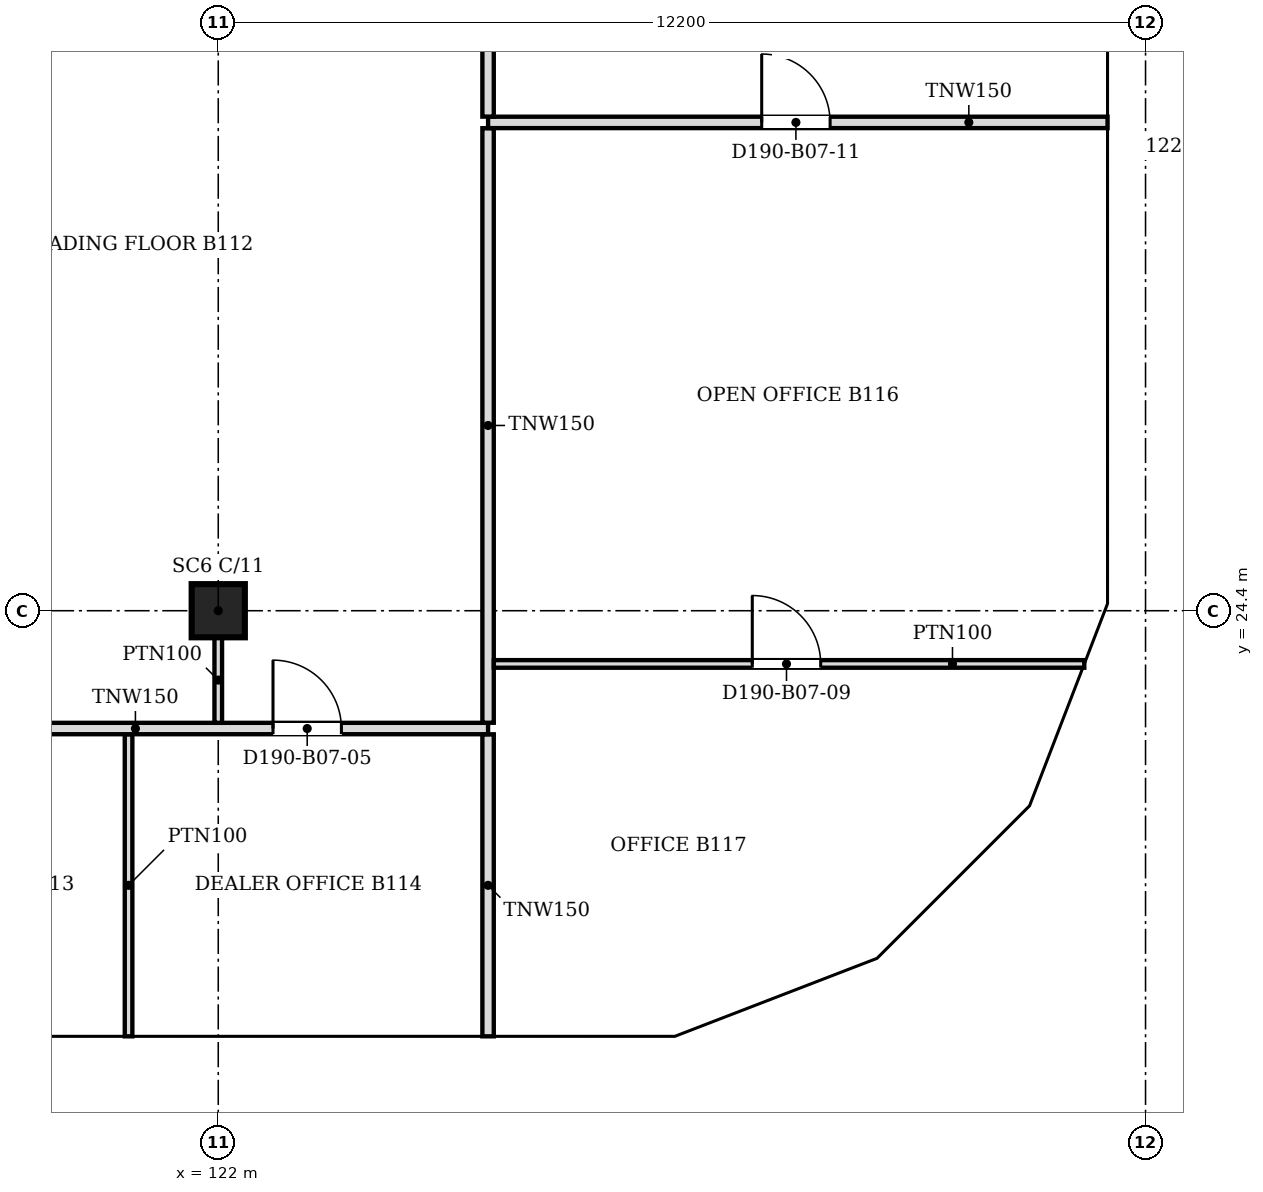
"""IFC4 building model, lengths in metres.
Left out: names, types, materials, properties, quantities, classifications, styles, units other than length and angle.
Written with IfcOpenShell. Run it as: python <this file> out.ifc"""

import sys

from ifc_helpers import new_model, si_unit, direction, frame, frame_2d, origin, origin_2d, place, context, subcontext, project, spatial, polyline, rectangle, outline, extrude, faceted_brep, source, transform, mapped, element, fill, save


model = new_model("IFC4")
c1 = context("Model", 3, precision=1e-05, world=origin(), true_north=direction((0.0, 1.0)))
c2 = subcontext(c1, "Body", "Model", "MODEL_VIEW")
j1 = project(units=[si_unit("LENGTHUNIT", "METRE"), si_unit("PLANEANGLEUNIT", "RADIAN")], contexts=[c1])
p1 = place(None, origin())
s1 = spatial("IfcSite", under=j1, at=p1, CompositionType="ELEMENT")
p2 = place(p1, origin())
s2 = spatial("IfcBuilding", under=s1, at=p2, CompositionType="ELEMENT")
p3 = place(p2, frame((0.0, 0.0, 68.6)))
s3 = spatial("IfcBuildingStorey", under=s2, at=p3, CompositionType="ELEMENT", Elevation=68.6)
p4 = place(p3, frame((122.0, 24.4, 0.0), z_axis=(0.0, 0.0, 1.0), x_axis=(1.0, 0.0, 0.0)))
e1 = element("IfcColumn", 1, at=p4, inside=s3, PredefinedType="COLUMN", context=c2, shape_type="SweptSolid", body=[
    extrude(rectangle(XDim=0.7, YDim=0.7, at=origin_2d()), origin(), (0.0, 0.0, 1.0), 3.6),
])
m1 = source(origin(), c2, "Body", "SweptSolid", [
    extrude(outline(polyline([(6.1, 0.0), (3.05, 3.8), (0.0, 0.0), (6.1, 0.0)])), frame((0.0, 0.25, 0.0), z_axis=(0.0, -1.0, 0.0), x_axis=(1.0, 0.0, 0.0)), (0.0, 0.0, 1.0), 0.5),
])
p5 = place(p3, frame((118.95, 18.55, 0.0), z_axis=(0.0, 0.0, 1.0), x_axis=(1.0, 0.0, 0.0)))
e2 = element("IfcWall", 2, at=p5, inside=s3, PredefinedType="SOLIDWALL", context=c2, shape_type="MappedRepresentation", body=[
    mapped(m1, transform((0.0, 0.0, 0.0), scale=1.0)),
])
m2 = source(origin(), c2, "Body", "SweptSolid", [
    extrude(outline(polyline([(5.579, 0.25), (3.05, 3.4), (0.521, 0.25), (5.579, 0.25)])), frame((0.0, 0.26, 0.0), z_axis=(0.0, -1.0, 0.0), x_axis=(1.0, 0.0, 0.0)), (0.0, 0.0, 1.0), 0.52),
])
p6 = place(p5, origin())
e3 = element("IfcOpeningElement", 3, at=p6, cuts=e2, PredefinedType="OPENING", context=c2, shape_type="MappedRepresentation", body=[
    mapped(m2, transform((0.0, 0.0, 0.0), scale=1.0)),
])
m3 = source(origin(), c2, "Body", "Brep", [
    faceted_brep([(3.05, -0.25, 3.74), (3.003, -0.25, 3.8), (0.0, -0.25, 0.0), (3.05, -0.25, 0.0), (0.0, 0.25, 0.0), (2.957, 0.25, 3.741), (2.957, 0.25, 0.0), (3.003, 0.0, 3.8)], [[[0, 1, 2, 3]], [[4, 5, 6]], [[7, 1, 0]], [[5, 4, 2, 1, 7]], [[4, 6, 3, 2]], [[3, 6, 5, 7, 0]]]),
])
p7 = place(p3, frame((125.05, 18.55, 0.0), z_axis=(0.0, 0.0, 1.0), x_axis=(1.0, 0.0, 0.0)))
e4 = element("IfcWall", 4, at=p7, inside=s3, PredefinedType="SOLIDWALL", context=c2, shape_type="MappedRepresentation", body=[
    mapped(m3, transform((0.0, 0.0, 0.0), scale=1.0)),
])
m4 = source(origin(), c2, "Body", "SweptSolid", [
    extrude(outline(polyline([(2.803, 3.144), (0.516, 0.25), (2.803, 0.25), (2.803, 3.144)])), frame((0.0, 0.26, 0.0), z_axis=(0.0, -1.0, 0.0), x_axis=(1.0, 0.0, 0.0)), (0.0, 0.0, 1.0), 0.52),
])
p8 = place(p7, origin())
e5 = element("IfcOpeningElement", 5, at=p8, cuts=e4, PredefinedType="OPENING", context=c2, shape_type="MappedRepresentation", body=[
    mapped(m4, transform((0.0, 0.0, 0.0), scale=1.0)),
])
m5 = source(origin(), c2, "Body", "Brep", [
    faceted_brep([(2.997, -0.25, 0.0), (0.047, -0.25, 3.8), (0.0, -0.25, 3.741), (0.0, -0.25, 0.0), (0.093, 0.25, 3.74), (2.944, 0.25, 0.068), (2.944, 0.25, 0.0), (0.093, 0.25, 0.0), (0.047, 0.0, 3.8), (2.997, 0.0, 0.0)], [[[0, 1, 2, 3]], [[4, 5, 6, 7]], [[5, 4, 8, 1, 0, 9]], [[2, 1, 8]], [[7, 6, 9, 0, 3]], [[7, 3, 2, 8, 4]], [[9, 6, 5]]]),
])
p9 = place(p3, frame((128.01, 18.533, 0.0), z_axis=(0.0, 0.0, 1.0), x_axis=(0.932990326376, 0.359901446078, 0.0)))
e6 = element("IfcWall", 6, at=p9, inside=s3, PredefinedType="SOLIDWALL", context=c2, shape_type="MappedRepresentation", body=[
    mapped(m5, transform((0.0, 0.0, 0.0), scale=1.0)),
])
m6 = source(origin(), c2, "Body", "SweptSolid", [
    extrude(outline(polyline([(2.487, 0.25), (0.247, 3.135), (0.247, 0.25), (2.487, 0.25)])), frame((0.0, 0.26, 0.0), z_axis=(0.0, -1.0, 0.0), x_axis=(1.0, 0.0, 0.0)), (0.0, 0.0, 1.0), 0.52),
])
p10 = place(p9, origin())
e7 = element("IfcOpeningElement", 7, at=p10, cuts=e6, PredefinedType="OPENING", context=c2, shape_type="MappedRepresentation", body=[
    mapped(m6, transform((0.0, 0.0, 0.0), scale=1.0)),
])
m7 = source(origin(), c2, "Body", "Brep", [
    faceted_brep([(2.997, -0.25, 3.732), (2.944, -0.25, 3.8), (0.0, -0.25, 0.0), (2.997, -0.25, 0.0), (0.053, 0.25, 0.068), (2.891, 0.25, 3.732), (2.891, 0.25, 0.0), (0.053, 0.25, 0.0), (2.944, 0.0, 3.8), (0.0, 0.0, 0.0)], [[[0, 1, 2, 3]], [[4, 5, 6, 7]], [[8, 1, 0]], [[5, 4, 9, 2, 1, 8]], [[7, 6, 3, 2, 9]], [[7, 9, 4]], [[3, 6, 5, 8, 0]]]),
])
p11 = place(p3, frame((130.806, 19.612, 0.0), z_axis=(0.0, 0.0, 1.0), x_axis=(0.707106781187, 0.707106781187, 0.0)))
e8 = element("IfcWall", 8, at=p11, inside=s3, PredefinedType="SOLIDWALL", context=c2, shape_type="MappedRepresentation", body=[
    mapped(m7, transform((0.0, 0.0, 0.0), scale=1.0)),
])
m8 = source(origin(), c2, "Body", "SweptSolid", [
    extrude(outline(polyline([(2.744, 3.134), (0.51, 0.25), (2.744, 0.25), (2.744, 3.134)])), frame((0.0, 0.26, 0.0), z_axis=(0.0, -1.0, 0.0), x_axis=(1.0, 0.0, 0.0)), (0.0, 0.0, 1.0), 0.52),
])
p12 = place(p11, origin())
e9 = element("IfcOpeningElement", 9, at=p12, cuts=e8, PredefinedType="OPENING", context=c2, shape_type="MappedRepresentation", body=[
    mapped(m8, transform((0.0, 0.0, 0.0), scale=1.0)),
])
m9 = source(origin(), c2, "Body", "Brep", [
    faceted_brep([(3.003, -0.25, 0.0), (0.053, -0.25, 3.8), (0.0, -0.25, 3.731), (0.0, -0.25, 0.0), (0.106, 0.25, 3.732), (2.957, 0.25, 0.06), (2.957, 0.25, 0.0), (0.106, 0.25, 0.0), (0.053, 0.0, 3.8), (3.003, 0.0, 0.0)], [[[0, 1, 2, 3]], [[4, 5, 6, 7]], [[5, 4, 8, 1, 0, 9]], [[2, 1, 8]], [[7, 6, 9, 0, 3]], [[7, 3, 2, 8, 4]], [[9, 6, 5]]]),
])
p13 = place(p3, frame((132.869, 21.644, 0.0), z_axis=(0.0, 0.0, 1.0), x_axis=(0.359855894603, 0.933007896601, 0.0)))
e10 = element("IfcWall", 10, at=p13, inside=s3, PredefinedType="SOLIDWALL", context=c2, shape_type="MappedRepresentation", body=[
    mapped(m9, transform((0.0, 0.0, 0.0), scale=1.0)),
])
m10 = source(origin(), c2, "Body", "SweptSolid", [
    extrude(outline(polyline([(2.493, 0.25), (0.253, 3.135), (0.253, 0.25), (2.493, 0.25)])), frame((0.0, 0.26, 0.0), z_axis=(0.0, -1.0, 0.0), x_axis=(1.0, 0.0, 0.0)), (0.0, 0.0, 1.0), 0.52),
])
p14 = place(p13, origin())
e11 = element("IfcOpeningElement", 11, at=p14, cuts=e10, PredefinedType="OPENING", context=c2, shape_type="MappedRepresentation", body=[
    mapped(m10, transform((0.0, 0.0, 0.0), scale=1.0)),
])
m11 = source(origin(), c2, "Body", "Brep", [
    faceted_brep([(6.053, -0.25, 0.0), (3.003, -0.25, 3.8), (0.0, -0.25, 0.0), (0.047, 0.25, 0.059), (3.003, 0.25, 3.8), (6.053, 0.25, 0.0), (0.047, 0.25, 0.0), (0.0, 0.0, 0.0)], [[[0, 1, 2]], [[3, 4, 5, 6]], [[5, 4, 1, 0]], [[4, 3, 7, 2, 1]], [[6, 5, 0, 2, 7]], [[6, 7, 3]]]),
])
p15 = place(p3, frame((133.95, 24.447, 0.0), z_axis=(0.0, 0.0, 1.0), x_axis=(0.0, 1.0, 0.0)))
e12 = element("IfcWall", 12, at=p15, inside=s3, PredefinedType="SOLIDWALL", context=c2, shape_type="MappedRepresentation", body=[
    mapped(m11, transform((0.0, 0.0, 0.0), scale=1.0)),
])
m12 = source(origin(), c2, "Body", "SweptSolid", [
    extrude(outline(polyline([(5.532, 0.25), (3.005, 3.399), (0.516, 0.25), (5.532, 0.25)])), frame((0.0, 0.26, 0.0), z_axis=(0.0, -1.0, 0.0), x_axis=(1.0, 0.0, 0.0)), (0.0, 0.0, 1.0), 0.52),
])
p16 = place(p15, origin())
e13 = element("IfcOpeningElement", 13, at=p16, cuts=e12, PredefinedType="OPENING", context=c2, shape_type="MappedRepresentation", body=[
    mapped(m12, transform((0.0, 0.0, 0.0), scale=1.0)),
])
p17 = place(p3, frame((133.95, 30.5, 0.0), z_axis=(0.0, 0.0, 1.0), x_axis=(0.0, 1.0, 0.0)))
e14 = element("IfcWall", 14, at=p17, inside=s3, PredefinedType="SOLIDWALL", context=c2, shape_type="MappedRepresentation", body=[
    mapped(m1, transform((0.0, 0.0, 0.0), scale=1.0)),
])
p18 = place(p17, origin())
e15 = element("IfcOpeningElement", 15, at=p18, cuts=e14, PredefinedType="OPENING", context=c2, shape_type="MappedRepresentation", body=[
    mapped(m2, transform((0.0, 0.0, 0.0), scale=1.0)),
])
p19 = place(p2, frame((0.0, 0.0, 72.4)))
s4 = spatial("IfcBuildingStorey", under=s2, at=p19, CompositionType="ELEMENT", Elevation=72.4)
m13 = source(origin(), c2, "Body", "SweptSolid", [
    extrude(outline(polyline([(3.05, 0.0), (6.1, 3.8), (3.05, 7.6), (0.0, 3.8), (3.05, 0.0)])), frame((0.0, 0.25, 0.0), z_axis=(0.0, -1.0, 0.0), x_axis=(1.0, 0.0, 0.0)), (0.0, 0.0, 1.0), 0.5),
])
p20 = place(p19, frame((115.9, 18.55, -3.8), z_axis=(0.0, 0.0, 1.0), x_axis=(1.0, 0.0, 0.0)))
e16 = element("IfcWall", 16, at=p20, inside=s4, PredefinedType="SOLIDWALL", context=c2, shape_type="MappedRepresentation", body=[
    mapped(m13, transform((0.0, 0.0, 0.0), scale=1.0)),
])
m14 = source(origin(), c2, "Body", "SweptSolid", [
    extrude(outline(polyline([(3.05, 0.399), (5.78, 3.8), (3.05, 7.2), (0.321, 3.8), (3.05, 0.399)])), frame((0.0, 0.26, 0.0), z_axis=(0.0, -1.0, 0.0), x_axis=(1.0, 0.0, 0.0)), (0.0, 0.0, 1.0), 0.52),
])
p21 = place(p20, origin())
e17 = element("IfcOpeningElement", 17, at=p21, cuts=e16, PredefinedType="OPENING", context=c2, shape_type="MappedRepresentation", body=[
    mapped(m14, transform((0.0, 0.0, 0.0), scale=1.0)),
])
m15 = source(origin(), c2, "Body", "Brep", [
    faceted_brep([(3.05, -0.25, 0.0), (6.053, -0.25, 3.8), (3.05, -0.25, 7.6), (0.0, -0.25, 3.8), (0.0, 0.25, 3.8), (3.05, 0.25, 7.6), (6.007, 0.25, 3.859), (6.007, 0.25, 3.741), (3.05, 0.25, 0.0), (6.053, 0.0, 3.8)], [[[0, 1, 2, 3]], [[4, 5, 6, 7, 8]], [[8, 7, 9, 1, 0]], [[6, 5, 2, 1, 9]], [[5, 4, 3, 2]], [[4, 8, 0, 3]], [[9, 7, 6]]]),
])
p22 = place(p19, frame((122.0, 18.55, -3.8), z_axis=(0.0, 0.0, 1.0), x_axis=(1.0, 0.0, 0.0)))
e18 = element("IfcWall", 18, at=p22, inside=s4, PredefinedType="SOLIDWALL", context=c2, shape_type="MappedRepresentation", body=[
    mapped(m15, transform((0.0, 0.0, 0.0), scale=1.0)),
])
m16 = source(origin(), c2, "Body", "SweptSolid", [
    extrude(outline(polyline([(3.049, 0.401), (5.735, 3.8), (3.049, 7.199), (0.321, 3.8), (3.049, 0.401)])), frame((0.0, 0.26, 0.0), z_axis=(0.0, -1.0, 0.0), x_axis=(1.0, 0.0, 0.0)), (0.0, 0.0, 1.0), 0.52),
])
p23 = place(p22, origin())
e19 = element("IfcOpeningElement", 19, at=p23, cuts=e18, PredefinedType="OPENING", context=c2, shape_type="MappedRepresentation", body=[
    mapped(m16, transform((0.0, 0.0, 0.0), scale=1.0)),
])
m17 = source(origin(), c2, "Body", "Brep", [
    faceted_brep([(2.95, -0.25, 0.0), (3.003, -0.25, 0.068), (3.003, -0.25, 7.531), (2.95, -0.25, 7.6), (0.0, -0.25, 3.8), (0.047, 0.25, 3.86), (2.898, 0.25, 7.532), (2.898, 0.25, 0.068), (0.047, 0.25, 3.74), (2.95, 0.0, 0.0), (2.95, 0.0, 7.6), (0.0, 0.0, 3.8)], [[[0, 1, 2, 3, 4]], [[5, 6, 7, 8]], [[1, 0, 9]], [[10, 3, 2]], [[6, 5, 11, 4, 3, 10]], [[8, 7, 9, 0, 4, 11]], [[8, 11, 5]], [[1, 9, 7, 6, 10, 2]]]),
])
p24 = place(p19, frame((128.053, 18.55, -3.8), z_axis=(0.0, 0.0, 1.0), x_axis=(0.933007896601, 0.359855894603, 0.0)))
e20 = element("IfcWall", 20, at=p24, inside=s4, PredefinedType="SOLIDWALL", context=c2, shape_type="MappedRepresentation", body=[
    mapped(m17, transform((0.0, 0.0, 0.0), scale=1.0)),
])
m18 = source(origin(), c2, "Body", "SweptSolid", [
    extrude(outline(polyline([(2.75, 6.935), (0.316, 3.8), (2.75, 0.665), (2.75, 6.935)])), frame((0.0, 0.26, 0.0), z_axis=(0.0, -1.0, 0.0), x_axis=(1.0, 0.0, 0.0)), (0.0, 0.0, 1.0), 0.52),
])
p25 = place(p24, origin())
e21 = element("IfcOpeningElement", 21, at=p25, cuts=e20, PredefinedType="OPENING", context=c2, shape_type="MappedRepresentation", body=[
    mapped(m18, transform((0.0, 0.0, 0.0), scale=1.0)),
])
m19 = source(origin(), c2, "Body", "Brep", [
    faceted_brep([(0.053, -0.25, 0.0), (2.997, -0.25, 3.8), (0.053, -0.25, 7.6), (0.0, -0.25, 7.532), (0.0, -0.25, 0.068), (0.106, 0.25, 7.531), (2.944, 0.25, 3.868), (2.944, 0.25, 3.732), (0.106, 0.25, 0.068), (2.997, 0.0, 3.8), (0.053, 0.0, 0.0), (0.053, 0.0, 7.6)], [[[0, 1, 2, 3, 4]], [[5, 6, 7, 8]], [[8, 7, 9, 1, 0, 10]], [[6, 5, 11, 2, 1, 9]], [[3, 2, 11]], [[10, 0, 4]], [[8, 10, 4, 3, 11, 5]], [[9, 7, 6]]]),
])
p26 = place(p19, frame((130.769, 19.574, -3.8), z_axis=(0.0, 0.0, 1.0), x_axis=(0.707106781187, 0.707106781187, 0.0)))
e22 = element("IfcWall", 22, at=p26, inside=s4, PredefinedType="SOLIDWALL", context=c2, shape_type="MappedRepresentation", body=[
    mapped(m19, transform((0.0, 0.0, 0.0), scale=1.0)),
])
m20 = source(origin(), c2, "Body", "SweptSolid", [
    extrude(outline(polyline([(0.253, 0.666), (2.681, 3.8), (0.253, 6.934), (0.253, 0.666)])), frame((0.0, 0.26, 0.0), z_axis=(0.0, -1.0, 0.0), x_axis=(1.0, 0.0, 0.0)), (0.0, 0.0, 1.0), 0.52),
])
p27 = place(p26, origin())
e23 = element("IfcOpeningElement", 23, at=p27, cuts=e22, PredefinedType="OPENING", context=c2, shape_type="MappedRepresentation", body=[
    mapped(m20, transform((0.0, 0.0, 0.0), scale=1.0)),
])
m21 = source(origin(), c2, "Body", "Brep", [
    faceted_brep([(2.95, -0.25, 0.0), (2.997, -0.25, 0.059), (2.997, -0.25, 7.541), (2.95, -0.25, 7.6), (0.0, -0.25, 3.8), (0.053, 0.25, 3.868), (2.904, 0.25, 7.54), (2.904, 0.25, 0.06), (0.053, 0.25, 3.732), (2.95, 0.0, 0.0), (2.95, 0.0, 7.6), (0.0, 0.0, 3.8)], [[[0, 1, 2, 3, 4]], [[5, 6, 7, 8]], [[1, 0, 9]], [[10, 3, 2]], [[6, 5, 11, 4, 3, 10]], [[8, 7, 9, 0, 4, 11]], [[8, 11, 5]], [[1, 9, 7, 6, 10, 2]]]),
])
p28 = place(p19, frame((132.888, 21.694, -3.8), z_axis=(0.0, 0.0, 1.0), x_axis=(0.359901446078, 0.932990326376, 0.0)))
e24 = element("IfcWall", 24, at=p28, inside=s4, PredefinedType="SOLIDWALL", context=c2, shape_type="MappedRepresentation", body=[
    mapped(m21, transform((0.0, 0.0, 0.0), scale=1.0)),
])
p29 = place(p28, origin())
e25 = element("IfcOpeningElement", 25, at=p29, cuts=e24, PredefinedType="OPENING", context=c2, shape_type="MappedRepresentation", body=[
    mapped(m18, transform((0.0, 0.0, 0.0), scale=1.0)),
])
m22 = source(origin(), c2, "Body", "Brep", [
    faceted_brep([(0.047, -0.25, 0.0), (3.05, -0.25, 3.8), (0.047, -0.25, 7.6), (0.0, -0.25, 7.54), (0.0, -0.25, 0.06), (0.093, 0.25, 7.541), (3.05, 0.25, 3.8), (0.093, 0.25, 0.059), (0.047, 0.0, 0.0), (0.047, 0.0, 7.6)], [[[0, 1, 2, 3, 4]], [[5, 6, 7]], [[7, 6, 1, 0, 8]], [[6, 5, 9, 2, 1]], [[3, 2, 9]], [[8, 0, 4]], [[7, 8, 4, 3, 9, 5]]]),
])
p30 = place(p19, frame((133.95, 24.4, -3.8), z_axis=(0.0, 0.0, 1.0), x_axis=(0.0, 1.0, 0.0)))
e26 = element("IfcWall", 26, at=p30, inside=s4, PredefinedType="SOLIDWALL", context=c2, shape_type="MappedRepresentation", body=[
    mapped(m22, transform((0.0, 0.0, 0.0), scale=1.0)),
])
m23 = source(origin(), c2, "Body", "SweptSolid", [
    extrude(outline(polyline([(0.247, 0.656), (2.731, 3.8), (0.247, 6.944), (0.247, 0.656)])), frame((0.0, 0.26, 0.0), z_axis=(0.0, -1.0, 0.0), x_axis=(1.0, 0.0, 0.0)), (0.0, 0.0, 1.0), 0.52),
])
p31 = place(p30, origin())
e27 = element("IfcOpeningElement", 27, at=p31, cuts=e26, PredefinedType="OPENING", context=c2, shape_type="MappedRepresentation", body=[
    mapped(m23, transform((0.0, 0.0, 0.0), scale=1.0)),
])
p32 = place(p19, frame((133.95, 27.45, -3.8), z_axis=(0.0, 0.0, 1.0), x_axis=(0.0, 1.0, 0.0)))
e28 = element("IfcWall", 28, at=p32, inside=s4, PredefinedType="SOLIDWALL", context=c2, shape_type="MappedRepresentation", body=[
    mapped(m13, transform((0.0, 0.0, 0.0), scale=1.0)),
])
p33 = place(p32, origin())
e29 = element("IfcOpeningElement", 29, at=p33, cuts=e28, PredefinedType="OPENING", context=c2, shape_type="MappedRepresentation", body=[
    mapped(m14, transform((0.0, 0.0, 0.0), scale=1.0)),
])
p34 = place(p3, frame((120.82, 18.8, 0.0), z_axis=(0.0, 0.0, 1.0), x_axis=(0.0, 1.0, 0.0)))
e30 = element("IfcWall", 30, at=p34, inside=s3, PredefinedType="PARTITIONING", context=c2, shape_type="SweptSolid", body=[
    extrude(rectangle(XDim=3.974, YDim=0.1, at=frame_2d((1.987, 0.0))), origin(), (0.0, 0.0, 1.0), 3.067),
])
p35 = place(p3, frame((125.55, 18.8, 0.0), z_axis=(0.0, 0.0, 1.0), x_axis=(0.0, 1.0, 0.0)))
e31 = element("IfcWall", 31, at=p35, inside=s3, PredefinedType="PARTITIONING", context=c2, shape_type="SweptSolid", body=[
    extrude(rectangle(XDim=3.974, YDim=0.15, at=frame_2d((1.987, 0.0))), origin(), (0.0, 0.0, 1.0), 3.067),
])
p36 = place(p3, frame((125.55, 22.85, 0.0), z_axis=(0.0, 0.0, 1.0), x_axis=(-1.0, 0.0, 0.0)))
e32 = element("IfcWall", 32, at=p36, inside=s3, PredefinedType="PARTITIONING", context=c2, shape_type="SweptSolid", body=[
    extrude(rectangle(XDim=9.15, YDim=0.15, at=frame_2d((4.575, 0.0))), origin(), (0.0, 0.0, 1.0), 3.067),
])
m24 = source(origin(), c2, "Body", "SweptSolid", [
    extrude(rectangle(XDim=0.9, YDim=2.1, at=frame_2d((0.45, 1.05))), frame((0.0, 0.085, 0.0), z_axis=(0.0, -1.0, 0.0), x_axis=(1.0, 0.0, 0.0)), (0.0, 0.0, 1.0), 0.17),
])
p37 = place(p36, frame((6.45, 0.0, 0.0)))
e33 = element("IfcOpeningElement", 33, at=p37, cuts=e32, PredefinedType="OPENING", context=c2, shape_type="MappedRepresentation", body=[
    mapped(m24, transform((0.0, 0.0, 0.0), scale=1.0)),
])
p38 = place(p36, frame((1.93, 0.0, 0.0)))
e34 = element("IfcOpeningElement", 34, at=p38, cuts=e32, PredefinedType="OPENING", context=c2, shape_type="MappedRepresentation", body=[
    mapped(m24, transform((0.0, 0.0, 0.0), scale=1.0)),
])
p39 = place(p3, frame((125.55, 22.926, 0.0), z_axis=(0.0, 0.0, 1.0), x_axis=(0.0, 1.0, 0.0)))
e35 = element("IfcWall", 35, at=p39, inside=s3, PredefinedType="PARTITIONING", context=c2, shape_type="SweptSolid", body=[
    extrude(rectangle(XDim=7.823, YDim=0.15, at=frame_2d((3.912, 0.0))), origin(), (0.0, 0.0, 1.0), 3.067),
])
p40 = place(p3, frame((133.394, 23.7, 0.0), z_axis=(0.0, 0.0, 1.0), x_axis=(-1.0, 0.0, 0.0)))
e36 = element("IfcWall", 36, at=p40, inside=s3, PredefinedType="PARTITIONING", context=c2, shape_type="SweptSolid", body=[
    extrude(rectangle(XDim=7.768, YDim=0.1, at=frame_2d((3.884, 0.0))), origin(), (0.0, 0.0, 1.0), 3.067),
])
m25 = source(origin(), c2, "Body", "SweptSolid", [
    extrude(rectangle(XDim=0.9, YDim=2.1, at=frame_2d((0.45, 1.05))), frame((0.0, 0.06, 0.0), z_axis=(0.0, -1.0, 0.0), x_axis=(1.0, 0.0, 0.0)), (0.0, 0.0, 1.0), 0.12),
])
p41 = place(p40, frame((3.468, 0.0, 0.0)))
e37 = element("IfcOpeningElement", 37, at=p41, cuts=e36, PredefinedType="OPENING", context=c2, shape_type="MappedRepresentation", body=[
    mapped(m25, transform((0.0, 0.0, 0.0), scale=1.0)),
])
p42 = place(p3, frame((122.0, 24.05, 0.0), z_axis=(0.0, 0.0, 1.0), x_axis=(0.0, -1.0, 0.0)))
e38 = element("IfcWall", 38, at=p42, inside=s3, PredefinedType="PARTITIONING", context=c2, shape_type="SweptSolid", body=[
    extrude(rectangle(XDim=1.125, YDim=0.1, at=frame_2d((0.562, 0.0))), origin(), (0.0, 0.0, 1.0), 3.067),
])
p43 = place(p3, frame((133.7, 30.825, 0.0), z_axis=(0.0, 0.0, 1.0), x_axis=(-1.0, 0.0, 0.0)))
e39 = element("IfcWall", 39, at=p43, inside=s3, PredefinedType="PARTITIONING", context=c2, shape_type="SweptSolid", body=[
    extrude(rectangle(XDim=8.15, YDim=0.15, at=frame_2d((4.075, 0.0))), origin(), (0.0, 0.0, 1.0), 3.067),
])
p44 = place(p43, frame((3.65, 0.0, 0.0)))
e40 = element("IfcOpeningElement", 40, at=p44, cuts=e39, PredefinedType="OPENING", context=c2, shape_type="MappedRepresentation", body=[
    mapped(m24, transform((0.0, 0.0, 0.0), scale=1.0)),
])
p45 = place(p3, frame((125.55, 30.901, 0.0), z_axis=(0.0, 0.0, 1.0), x_axis=(0.0, 1.0, 0.0)))
e41 = element("IfcWall", 41, at=p45, inside=s3, PredefinedType="PARTITIONING", context=c2, shape_type="SweptSolid", body=[
    extrude(rectangle(XDim=2.823, YDim=0.15, at=frame_2d((1.412, 0.0))), origin(), (0.0, 0.0, 1.0), 3.067),
])
m26 = source(origin(), c2, "Body", "SweptSolid", [
    extrude(rectangle(XDim=0.9, YDim=2.1, at=frame_2d((0.45, 1.05))), frame((0.0, 0.025, 0.0), z_axis=(0.0, -1.0, 0.0), x_axis=(1.0, 0.0, 0.0)), (0.0, 0.0, 1.0), 0.05),
])
p46 = place(p38, origin())
e42 = element("IfcDoor", 42, at=p46, inside=s3, OperationType="SINGLE_SWING_RIGHT", PredefinedType="DOOR", context=c2, shape_type="MappedRepresentation", body=[
    mapped(m26, transform((0.0, 0.0, 0.0), scale=1.0)),
])
fill(e34, e42)
p47 = place(p41, origin())
e43 = element("IfcDoor", 43, at=p47, inside=s3, OperationType="SINGLE_SWING_RIGHT", PredefinedType="DOOR", context=c2, shape_type="MappedRepresentation", body=[
    mapped(m26, transform((0.0, 0.0, 0.0), scale=1.0)),
])
fill(e37, e43)
p48 = place(p44, origin())
e44 = element("IfcDoor", 44, at=p48, inside=s3, OperationType="SINGLE_SWING_RIGHT", PredefinedType="DOOR", context=c2, shape_type="MappedRepresentation", body=[
    mapped(m26, transform((0.0, 0.0, 0.0), scale=1.0)),
])
fill(e40, e44)
save(model, sys.argv[1])
